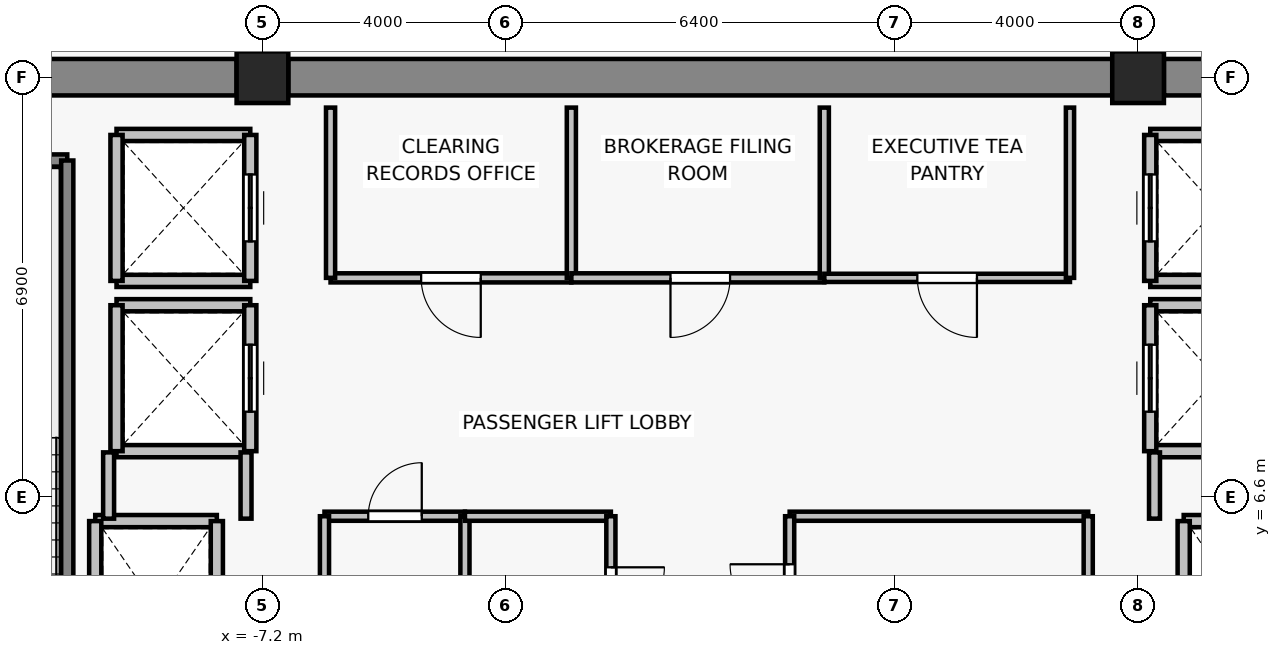
"""IFC4 building model, lengths in metres.
Left out: names, types, materials, properties, quantities, classifications, styles, units other than length and angle.
Written with IfcOpenShell. Run it as: python <this file> out.ifc"""

import sys

from ifc_helpers import new_model, si_unit, direction, frame, frame_2d, origin, origin_2d, place, context, subcontext, project, spatial, rectangle, extrude, source, transform, mapped, element, fill, save


model = new_model("IFC4")
c1 = context("Model", 3, precision=1e-05, world=origin(), true_north=direction((0.0, 1.0)))
c2 = subcontext(c1, "Body", "Model", "MODEL_VIEW")
j1 = project(units=[si_unit("LENGTHUNIT", "METRE"), si_unit("PLANEANGLEUNIT", "RADIAN")], contexts=[c1])
p1 = place(None, origin())
s1 = spatial("IfcSite", under=j1, at=p1, CompositionType="ELEMENT")
p2 = place(p1, origin())
s2 = spatial("IfcBuilding", under=s1, at=p2, CompositionType="ELEMENT")
p3 = place(p2, frame((0.0, 0.0, 228.7)))
s3 = spatial("IfcBuildingStorey", under=s2, at=p3, CompositionType="ELEMENT", Elevation=228.7)
for number, where, z_axis, x_axis in (
    (1, (-7.2, 13.5, 0.0), (0.0, 0.0, 1.0), (1.0, 0.0, 0.0)),
    (2, (7.2, 13.5, 0.0), (0.0, 0.0, 1.0), (1.0, 0.0, 0.0)),
):
    element("IfcColumn", number, at=place(p3, frame(where, z_axis=z_axis, x_axis=x_axis)), inside=s3, PredefinedType="COLUMN", context=c2, shape_type="SweptSolid", body=[
        extrude(rectangle(XDim=0.85, YDim=0.85, at=origin_2d()), origin(), (0.0, 0.0, 1.0), 3.3),
    ])
p4 = place(p3, frame((-13.975, 13.5, 0.0), z_axis=(0.0, 0.0, 1.0), x_axis=(1.0, 0.0, 0.0)))
e3 = element("IfcWall", 3, at=p4, inside=s3, PredefinedType="SHEAR", context=c2, shape_type="SweptSolid", body=[
    extrude(rectangle(XDim=6.35, YDim=0.6, at=frame_2d((3.175, 0.0))), origin(), (0.0, 0.0, 1.0), 3.075),
])
p5 = place(p3, frame((-6.775, 13.5, 0.0), z_axis=(0.0, 0.0, 1.0), x_axis=(1.0, 0.0, 0.0)))
e4 = element("IfcWall", 4, at=p5, inside=s3, PredefinedType="SHEAR", context=c2, shape_type="SweptSolid", body=[
    extrude(rectangle(XDim=13.55, YDim=0.6, at=frame_2d((6.775, 0.0))), origin(), (0.0, 0.0, 1.0), 3.075),
])
p6 = place(p3, frame((7.625, 13.5, 0.0), z_axis=(0.0, 0.0, 1.0), x_axis=(1.0, 0.0, 0.0)))
e5 = element("IfcWall", 5, at=p6, inside=s3, PredefinedType="SHEAR", context=c2, shape_type="SweptSolid", body=[
    extrude(rectangle(XDim=6.35, YDim=0.6, at=frame_2d((3.175, 0.0))), origin(), (0.0, 0.0, 1.0), 3.075),
])
p7 = place(p3, frame((-9.95, 6.2, 0.0), z_axis=(0.0, 0.0, 1.0), x_axis=(1.0, 0.0, 0.0)))
e6 = element("IfcWall", 6, at=p7, inside=s3, PredefinedType="SOLIDWALL", context=c2, shape_type="SweptSolid", body=[
    extrude(rectangle(XDim=2.0, YDim=0.2, at=frame_2d((1.0, 0.0))), origin(), (0.0, 0.0, 1.0), 3.075),
])
for number, where, z_axis, x_axis in (
    (7, (-9.95, 3.4, 0.0), (0.0, 0.0, 1.0), (0.0, 1.0, 0.0)),
    (8, (-7.95, 6.2, 0.0), (0.0, 0.0, 1.0), (0.0, -1.0, 0.0)),
):
    element("IfcWall", number, at=place(p3, frame(where, z_axis=z_axis, x_axis=x_axis)), inside=s3, PredefinedType="SOLIDWALL", context=c2, shape_type="SweptSolid", body=[
        extrude(rectangle(XDim=2.8, YDim=0.2, at=frame_2d((1.4, 0.0))), origin(), (0.0, 0.0, 1.0), 3.075),
    ])
p8 = place(p3, frame((7.95, 6.2, 0.0), z_axis=(0.0, 0.0, 1.0), x_axis=(1.0, 0.0, 0.0)))
e9 = element("IfcWall", 9, at=p8, inside=s3, PredefinedType="SOLIDWALL", context=c2, shape_type="SweptSolid", body=[
    extrude(rectangle(XDim=2.0, YDim=0.2, at=frame_2d((1.0, 0.0))), origin(), (0.0, 0.0, 1.0), 3.075),
])
p9 = place(p3, frame((7.95, 3.4, 0.0), z_axis=(0.0, 0.0, 1.0), x_axis=(0.0, 1.0, 0.0)))
e10 = element("IfcWall", 10, at=p9, inside=s3, PredefinedType="SOLIDWALL", context=c2, shape_type="SweptSolid", body=[
    extrude(rectangle(XDim=2.8, YDim=0.2, at=frame_2d((1.4, 0.0))), origin(), (0.0, 0.0, 1.0), 3.075),
])
for number, where, z_axis, x_axis in (
    (11, (-7.4, 7.35, 0.0), (0.0, 0.0, 1.0), (-1.0, 0.0, 0.0)),
    (12, (-9.6, 9.75, 0.0), (0.0, 0.0, 1.0), (1.0, 0.0, 0.0)),
):
    element("IfcWall", number, at=place(p3, frame(where, z_axis=z_axis, x_axis=x_axis)), inside=s3, PredefinedType="SOLIDWALL", context=c2, shape_type="SweptSolid", body=[
        extrude(rectangle(XDim=2.2, YDim=0.2, at=frame_2d((1.1, 0.0))), origin(), (0.0, 0.0, 1.0), 2.615),
    ])
p10 = place(p3, frame((-9.6, 7.35, 0.0), z_axis=(0.0, 0.0, 1.0), x_axis=(0.0, 1.0, 0.0)))
e13 = element("IfcWall", 13, at=p10, inside=s3, PredefinedType="SOLIDWALL", context=c2, shape_type="SweptSolid", body=[
    extrude(rectangle(XDim=2.4, YDim=0.2, at=frame_2d((1.2, 0.0))), origin(), (0.0, 0.0, 1.0), 3.075),
])
p11 = place(p3, frame((-7.4, 9.75, 0.0), z_axis=(0.0, 0.0, 1.0), x_axis=(0.0, -1.0, 0.0)))
e14 = element("IfcWall", 14, at=p11, inside=s3, PredefinedType="SOLIDWALL", context=c2, shape_type="SweptSolid", body=[
    extrude(rectangle(XDim=2.4, YDim=0.2, at=frame_2d((1.2, 0.0))), origin(), (0.0, 0.0, 1.0), 2.615),
])
p12 = place(p11, frame((0.65, 0.0, 0.0)))
e15 = element("IfcOpeningElement", 15, at=p12, cuts=e14, PredefinedType="OPENING", context=c2, shape_type="SweptSolid", body=[
    extrude(rectangle(XDim=1.1, YDim=2.2, at=frame_2d((0.55, 1.1))), frame((0.0, 0.11, 0.0), z_axis=(0.0, -1.0, 0.0), x_axis=(1.0, 0.0, 0.0)), (0.0, 0.0, 1.0), 0.22),
])
for number, where, z_axis, x_axis in (
    (16, (-7.4, 10.15, 0.0), (0.0, 0.0, 1.0), (-1.0, 0.0, 0.0)),
    (17, (-9.6, 12.55, 0.0), (0.0, 0.0, 1.0), (1.0, 0.0, 0.0)),
):
    element("IfcWall", number, at=place(p3, frame(where, z_axis=z_axis, x_axis=x_axis)), inside=s3, PredefinedType="SOLIDWALL", context=c2, shape_type="SweptSolid", body=[
        extrude(rectangle(XDim=2.2, YDim=0.2, at=frame_2d((1.1, 0.0))), origin(), (0.0, 0.0, 1.0), 2.615),
    ])
p13 = place(p3, frame((-9.6, 10.15, 0.0), z_axis=(0.0, 0.0, 1.0), x_axis=(0.0, 1.0, 0.0)))
e18 = element("IfcWall", 18, at=p13, inside=s3, PredefinedType="SOLIDWALL", context=c2, shape_type="SweptSolid", body=[
    extrude(rectangle(XDim=2.4, YDim=0.2, at=frame_2d((1.2, 0.0))), origin(), (0.0, 0.0, 1.0), 3.075),
])
p14 = place(p3, frame((-7.4, 12.55, 0.0), z_axis=(0.0, 0.0, 1.0), x_axis=(0.0, -1.0, 0.0)))
e19 = element("IfcWall", 19, at=p14, inside=s3, PredefinedType="SOLIDWALL", context=c2, shape_type="SweptSolid", body=[
    extrude(rectangle(XDim=2.4, YDim=0.2, at=frame_2d((1.2, 0.0))), origin(), (0.0, 0.0, 1.0), 2.615),
])
p15 = place(p14, frame((0.65, 0.0, 0.0)))
e20 = element("IfcOpeningElement", 20, at=p15, cuts=e19, PredefinedType="OPENING", context=c2, shape_type="SweptSolid", body=[
    extrude(rectangle(XDim=1.1, YDim=2.2, at=frame_2d((0.55, 1.1))), frame((0.0, 0.11, 0.0), z_axis=(0.0, -1.0, 0.0), x_axis=(1.0, 0.0, 0.0)), (0.0, 0.0, 1.0), 0.22),
])
for number, where, z_axis, x_axis in (
    (21, (9.6, 7.35, 0.0), (0.0, 0.0, 1.0), (-1.0, 0.0, 0.0)),
    (22, (7.4, 9.75, 0.0), (0.0, 0.0, 1.0), (1.0, 0.0, 0.0)),
):
    element("IfcWall", number, at=place(p3, frame(where, z_axis=z_axis, x_axis=x_axis)), inside=s3, PredefinedType="SOLIDWALL", context=c2, shape_type="SweptSolid", body=[
        extrude(rectangle(XDim=2.2, YDim=0.2, at=frame_2d((1.1, 0.0))), origin(), (0.0, 0.0, 1.0), 2.615),
    ])
p16 = place(p3, frame((7.4, 7.35, 0.0), z_axis=(0.0, 0.0, 1.0), x_axis=(0.0, 1.0, 0.0)))
e23 = element("IfcWall", 23, at=p16, inside=s3, PredefinedType="SOLIDWALL", context=c2, shape_type="SweptSolid", body=[
    extrude(rectangle(XDim=2.4, YDim=0.2, at=frame_2d((1.2, 0.0))), origin(), (0.0, 0.0, 1.0), 2.615),
])
p17 = place(p16, frame((0.65, 0.0, 0.0)))
e24 = element("IfcOpeningElement", 24, at=p17, cuts=e23, PredefinedType="OPENING", context=c2, shape_type="SweptSolid", body=[
    extrude(rectangle(XDim=1.1, YDim=2.2, at=frame_2d((0.55, 1.1))), frame((0.0, 0.11, 0.0), z_axis=(0.0, -1.0, 0.0), x_axis=(1.0, 0.0, 0.0)), (0.0, 0.0, 1.0), 0.22),
])
for number, where, z_axis, x_axis in (
    (25, (9.6, 10.15, 0.0), (0.0, 0.0, 1.0), (-1.0, 0.0, 0.0)),
    (26, (7.4, 12.55, 0.0), (0.0, 0.0, 1.0), (1.0, 0.0, 0.0)),
):
    element("IfcWall", number, at=place(p3, frame(where, z_axis=z_axis, x_axis=x_axis)), inside=s3, PredefinedType="SOLIDWALL", context=c2, shape_type="SweptSolid", body=[
        extrude(rectangle(XDim=2.2, YDim=0.2, at=frame_2d((1.1, 0.0))), origin(), (0.0, 0.0, 1.0), 2.615),
    ])
p18 = place(p3, frame((7.4, 10.15, 0.0), z_axis=(0.0, 0.0, 1.0), x_axis=(0.0, 1.0, 0.0)))
e27 = element("IfcWall", 27, at=p18, inside=s3, PredefinedType="SOLIDWALL", context=c2, shape_type="SweptSolid", body=[
    extrude(rectangle(XDim=2.4, YDim=0.2, at=frame_2d((1.2, 0.0))), origin(), (0.0, 0.0, 1.0), 2.615),
])
p19 = place(p18, frame((0.65, 0.0, 0.0)))
e28 = element("IfcOpeningElement", 28, at=p19, cuts=e27, PredefinedType="OPENING", context=c2, shape_type="SweptSolid", body=[
    extrude(rectangle(XDim=1.1, YDim=2.2, at=frame_2d((0.55, 1.1))), frame((0.0, 0.11, 0.0), z_axis=(0.0, -1.0, 0.0), x_axis=(1.0, 0.0, 0.0)), (0.0, 0.0, 1.0), 0.22),
])
p20 = place(p3, frame((-13.93, 12.13, 0.0), z_axis=(0.0, 0.0, 1.0), x_axis=(1.0, 0.0, 0.0)))
e29 = element("IfcWall", 29, at=p20, inside=s3, PredefinedType="SOLIDWALL", context=c2, shape_type="SweptSolid", body=[
    extrude(rectangle(XDim=3.52, YDim=0.2, at=frame_2d((1.76, 0.0))), origin(), (0.0, 0.0, 1.0), 3.075),
])
p21 = place(p3, frame((-10.41, 12.13, 0.0), z_axis=(0.0, 0.0, 1.0), x_axis=(0.0, -1.0, 0.0)))
e30 = element("IfcWall", 30, at=p21, inside=s3, PredefinedType="SOLIDWALL", context=c2, shape_type="SweptSolid", body=[
    extrude(rectangle(XDim=8.84, YDim=0.2, at=frame_2d((4.42, 0.0))), origin(), (0.0, 0.0, 1.0), 3.075),
])
p22 = place(p3, frame((-9.73, 6.24, 0.0), z_axis=(0.0, 0.0, 1.0), x_axis=(0.0, 1.0, 0.0)))
e31 = element("IfcWall", 31, at=p22, inside=s3, PredefinedType="PARTITIONING", context=c2, shape_type="SweptSolid", body=[
    extrude(rectangle(XDim=1.09, YDim=0.18, at=frame_2d((0.545, 0.0))), origin(), (0.0, 0.0, 1.0), 3.075),
])
for number, where, z_axis, x_axis in (
    (32, (-7.47, 7.33, 0.0), (0.0, 0.0, 1.0), (0.0, -1.0, 0.0)),
    (33, (7.47, 6.24, 0.0), (0.0, 0.0, 1.0), (0.0, 1.0, 0.0)),
):
    element("IfcWall", number, at=place(p3, frame(where, z_axis=z_axis, x_axis=x_axis)), inside=s3, PredefinedType="PARTITIONING", context=c2, shape_type="SweptSolid", body=[
        extrude(rectangle(XDim=1.09, YDim=0.18, at=frame_2d((0.545, 0.0))), origin(), (0.0, 0.0, 1.0), 2.615),
    ])
p23 = place(p3, frame((-2.12, 10.2, 0.0), z_axis=(0.0, 0.0, 1.0), x_axis=(-1.0, 0.0, 0.0)))
e34 = element("IfcWall", 34, at=p23, inside=s3, PredefinedType="PARTITIONING", context=c2, shape_type="SweptSolid", body=[
    extrude(rectangle(XDim=3.96, YDim=0.15, at=frame_2d((1.98, 0.0))), origin(), (0.0, 0.0, 1.0), 2.59),
])
p24 = place(p23, frame((1.49, 0.0, 0.0)))
e35 = element("IfcOpeningElement", 35, at=p24, cuts=e34, PredefinedType="OPENING", context=c2, shape_type="SweptSolid", body=[
    extrude(rectangle(XDim=0.98, YDim=2.15, at=frame_2d((0.49, 1.075))), frame((0.0, 0.085, 0.0), z_axis=(0.0, -1.0, 0.0), x_axis=(1.0, 0.0, 0.0)), (0.0, 0.0, 1.0), 0.17),
])
for number, where, z_axis, x_axis in (
    (36, (-6.08, 10.2, 0.0), (0.0, 0.0, 1.0), (0.0, 1.0, 0.0)),
    (37, (-2.12, 13.0, 0.0), (0.0, 0.0, 1.0), (0.0, -1.0, 0.0)),
):
    element("IfcWall", number, at=place(p3, frame(where, z_axis=z_axis, x_axis=x_axis)), inside=s3, PredefinedType="PARTITIONING", context=c2, shape_type="SweptSolid", body=[
        extrude(rectangle(XDim=2.8, YDim=0.15, at=frame_2d((1.4, 0.0))), origin(), (0.0, 0.0, 1.0), 3.075),
    ])
p25 = place(p3, frame((2.04, 10.2, 0.0), z_axis=(0.0, 0.0, 1.0), x_axis=(-1.0, 0.0, 0.0)))
e38 = element("IfcWall", 38, at=p25, inside=s3, PredefinedType="PARTITIONING", context=c2, shape_type="SweptSolid", body=[
    extrude(rectangle(XDim=4.16, YDim=0.15, at=frame_2d((2.08, 0.0))), origin(), (0.0, 0.0, 1.0), 2.59),
])
p26 = place(p25, frame((1.55, 0.0, 0.0)))
e39 = element("IfcOpeningElement", 39, at=p26, cuts=e38, PredefinedType="OPENING", context=c2, shape_type="SweptSolid", body=[
    extrude(rectangle(XDim=0.98, YDim=2.15, at=frame_2d((0.49, 1.075))), frame((0.0, 0.085, 0.0), z_axis=(0.0, -1.0, 0.0), x_axis=(1.0, 0.0, 0.0)), (0.0, 0.0, 1.0), 0.17),
])
p27 = place(p3, frame((2.04, 13.0, 0.0), z_axis=(0.0, 0.0, 1.0), x_axis=(0.0, -1.0, 0.0)))
e40 = element("IfcWall", 40, at=p27, inside=s3, PredefinedType="PARTITIONING", context=c2, shape_type="SweptSolid", body=[
    extrude(rectangle(XDim=2.8, YDim=0.15, at=frame_2d((1.4, 0.0))), origin(), (0.0, 0.0, 1.0), 3.075),
])
p28 = place(p3, frame((6.08, 10.2, 0.0), z_axis=(0.0, 0.0, 1.0), x_axis=(-1.0, 0.0, 0.0)))
e41 = element("IfcWall", 41, at=p28, inside=s3, PredefinedType="PARTITIONING", context=c2, shape_type="SweptSolid", body=[
    extrude(rectangle(XDim=4.04, YDim=0.135, at=frame_2d((2.02, 0.0))), origin(), (0.0, 0.0, 1.0), 2.59),
])
p29 = place(p28, frame((1.53, 0.0, 0.0)))
e42 = element("IfcOpeningElement", 42, at=p29, cuts=e41, PredefinedType="OPENING", context=c2, shape_type="SweptSolid", body=[
    extrude(rectangle(XDim=0.98, YDim=2.15, at=frame_2d((0.49, 1.075))), frame((0.0, 0.077, 0.0), z_axis=(0.0, -1.0, 0.0), x_axis=(1.0, 0.0, 0.0)), (0.0, 0.0, 1.0), 0.155),
])
p30 = place(p3, frame((6.08, 13.0, 0.0), z_axis=(0.0, 0.0, 1.0), x_axis=(0.0, -1.0, 0.0)))
e43 = element("IfcWall", 43, at=p30, inside=s3, PredefinedType="PARTITIONING", context=c2, shape_type="SweptSolid", body=[
    extrude(rectangle(XDim=2.8, YDim=0.135, at=frame_2d((1.4, 0.0))), origin(), (0.0, 0.0, 1.0), 3.075),
])
p31 = place(p3, frame((-6.18, 6.28, 0.0), z_axis=(0.0, 0.0, 1.0), x_axis=(1.0, 0.0, 0.0)))
e44 = element("IfcWall", 44, at=p31, inside=s3, PredefinedType="PARTITIONING", context=c2, shape_type="SweptSolid", body=[
    extrude(rectangle(XDim=2.31, YDim=0.15, at=frame_2d((1.155, 0.0))), origin(), (0.0, 0.0, 1.0), 3.075),
])
p32 = place(p31, frame((0.72, 0.0, 0.0)))
e45 = element("IfcOpeningElement", 45, at=p32, cuts=e44, PredefinedType="OPENING", context=c2, shape_type="SweptSolid", body=[
    extrude(rectangle(XDim=0.88, YDim=2.1, at=frame_2d((0.44, 1.05))), frame((0.0, 0.085, 0.0), z_axis=(0.0, -1.0, 0.0), x_axis=(1.0, 0.0, 0.0)), (0.0, 0.0, 1.0), 0.17),
])
for number, where, z_axis, x_axis in (
    (46, (-6.18, 3.76, 0.0), (0.0, 0.0, 1.0), (0.0, 1.0, 0.0)),
    (47, (-3.87, 6.28, 0.0), (0.0, 0.0, 1.0), (0.0, -1.0, 0.0)),
):
    element("IfcWall", number, at=place(p3, frame(where, z_axis=z_axis, x_axis=x_axis)), inside=s3, PredefinedType="PARTITIONING", context=c2, shape_type="SweptSolid", body=[
        extrude(rectangle(XDim=2.52, YDim=0.15, at=frame_2d((1.26, 0.0))), origin(), (0.0, 0.0, 1.0), 3.075),
    ])
p33 = place(p3, frame((-3.87, 6.28, 0.0), z_axis=(0.0, 0.0, 1.0), x_axis=(1.0, 0.0, 0.0)))
e48 = element("IfcWall", 48, at=p33, inside=s3, PredefinedType="PARTITIONING", context=c2, shape_type="SweptSolid", body=[
    extrude(rectangle(XDim=2.4, YDim=0.15, at=frame_2d((1.2, 0.0))), origin(), (0.0, 0.0, 1.0), 3.075),
])
p34 = place(p3, frame((-1.47, 6.28, 0.0), z_axis=(0.0, 0.0, 1.0), x_axis=(0.0, -1.0, 0.0)))
e49 = element("IfcWall", 49, at=p34, inside=s3, PredefinedType="PARTITIONING", context=c2, shape_type="SweptSolid", body=[
    extrude(rectangle(XDim=2.52, YDim=0.15, at=frame_2d((1.26, 0.0))), origin(), (0.0, 0.0, 1.0), 3.075),
])
p35 = place(p34, frame((0.84, 0.0, 0.0)))
e50 = element("IfcOpeningElement", 50, at=p35, cuts=e49, PredefinedType="OPENING", context=c2, shape_type="SweptSolid", body=[
    extrude(rectangle(XDim=0.88, YDim=2.1, at=frame_2d((0.44, 1.05))), frame((0.0, 0.085, 0.0), z_axis=(0.0, -1.0, 0.0), x_axis=(1.0, 0.0, 0.0)), (0.0, 0.0, 1.0), 0.17),
])
p36 = place(p3, frame((1.47, 6.28, 0.0), z_axis=(0.0, 0.0, 1.0), x_axis=(1.0, 0.0, 0.0)))
e51 = element("IfcWall", 51, at=p36, inside=s3, PredefinedType="PARTITIONING", context=c2, shape_type="SweptSolid", body=[
    extrude(rectangle(XDim=4.91, YDim=0.15, at=frame_2d((2.455, 0.0))), origin(), (0.0, 0.0, 1.0), 3.075),
])
p37 = place(p3, frame((1.47, 3.76, 0.0), z_axis=(0.0, 0.0, 1.0), x_axis=(0.0, 1.0, 0.0)))
e52 = element("IfcWall", 52, at=p37, inside=s3, PredefinedType="PARTITIONING", context=c2, shape_type="SweptSolid", body=[
    extrude(rectangle(XDim=2.52, YDim=0.15, at=frame_2d((1.26, 0.0))), origin(), (0.0, 0.0, 1.0), 3.075),
])
p38 = place(p37, frame((0.75, 0.0, 0.0)))
e53 = element("IfcOpeningElement", 53, at=p38, cuts=e52, PredefinedType="OPENING", context=c2, shape_type="SweptSolid", body=[
    extrude(rectangle(XDim=0.98, YDim=2.15, at=frame_2d((0.49, 1.075))), frame((0.0, 0.085, 0.0), z_axis=(0.0, -1.0, 0.0), x_axis=(1.0, 0.0, 0.0)), (0.0, 0.0, 1.0), 0.17),
])
p39 = place(p3, frame((6.38, 6.28, 0.0), z_axis=(0.0, 0.0, 1.0), x_axis=(0.0, -1.0, 0.0)))
e54 = element("IfcWall", 54, at=p39, inside=s3, PredefinedType="PARTITIONING", context=c2, shape_type="SweptSolid", body=[
    extrude(rectangle(XDim=2.52, YDim=0.15, at=frame_2d((1.26, 0.0))), origin(), (0.0, 0.0, 1.0), 3.075),
])
m1 = source(origin(), c2, "Body", "SweptSolid", [
    extrude(rectangle(XDim=1.1, YDim=2.2, at=frame_2d((0.55, 1.1))), frame((0.0, 0.025, 0.0), z_axis=(0.0, -1.0, 0.0), x_axis=(1.0, 0.0, 0.0)), (0.0, 0.0, 1.0), 0.05),
])
p40 = place(p12, origin())
e55 = element("IfcDoor", 55, at=p40, inside=s3, OperationType="DOUBLE_DOOR_SLIDING", PredefinedType="DOOR", context=c2, shape_type="MappedRepresentation", body=[
    mapped(m1, transform((0.0, 0.0, 0.0), x_axis=(1.0, 0.0, 0.0), y_axis=(0.0, 1.0, 0.0), z_axis=(0.0, 0.0, 1.0), scale=1.0)),
])
fill(e15, e55)
p41 = place(p15, origin())
e56 = element("IfcDoor", 56, at=p41, inside=s3, OperationType="DOUBLE_DOOR_SLIDING", PredefinedType="DOOR", context=c2, shape_type="MappedRepresentation", body=[
    mapped(m1, transform((0.0, 0.0, 0.0), x_axis=(1.0, 0.0, 0.0), y_axis=(0.0, 1.0, 0.0), z_axis=(0.0, 0.0, 1.0), scale=1.0)),
])
fill(e20, e56)
p42 = place(p17, origin())
e57 = element("IfcDoor", 57, at=p42, inside=s3, OperationType="DOUBLE_DOOR_SLIDING", PredefinedType="DOOR", context=c2, shape_type="MappedRepresentation", body=[
    mapped(m1, transform((0.0, 0.0, 0.0), x_axis=(1.0, 0.0, 0.0), y_axis=(0.0, 1.0, 0.0), z_axis=(0.0, 0.0, 1.0), scale=1.0)),
])
fill(e24, e57)
p43 = place(p19, origin())
e58 = element("IfcDoor", 58, at=p43, inside=s3, OperationType="DOUBLE_DOOR_SLIDING", PredefinedType="DOOR", context=c2, shape_type="MappedRepresentation", body=[
    mapped(m1, transform((0.0, 0.0, 0.0), x_axis=(1.0, 0.0, 0.0), y_axis=(0.0, 1.0, 0.0), z_axis=(0.0, 0.0, 1.0), scale=1.0)),
])
fill(e28, e58)
m2 = source(origin(), c2, "Body", "SweptSolid", [
    extrude(rectangle(XDim=0.98, YDim=2.15, at=frame_2d((0.49, 1.075))), frame((0.0, 0.025, 0.0), z_axis=(0.0, -1.0, 0.0), x_axis=(1.0, 0.0, 0.0)), (0.0, 0.0, 1.0), 0.05),
])
p44 = place(p24, origin())
e59 = element("IfcDoor", 59, at=p44, inside=s3, OperationType="SINGLE_SWING_LEFT", PredefinedType="DOOR", context=c2, shape_type="MappedRepresentation", body=[
    mapped(m2, transform((0.0, 0.0, 0.0), x_axis=(1.0, 0.0, 0.0), y_axis=(0.0, 1.0, 0.0), z_axis=(0.0, 0.0, 1.0), scale=1.0)),
])
fill(e35, e59)
p45 = place(p26, origin())
e60 = element("IfcDoor", 60, at=p45, inside=s3, OperationType="SINGLE_SWING_RIGHT", PredefinedType="DOOR", context=c2, shape_type="MappedRepresentation", body=[
    mapped(m2, transform((0.0, 0.0, 0.0), x_axis=(1.0, 0.0, 0.0), y_axis=(0.0, 1.0, 0.0), z_axis=(0.0, 0.0, 1.0), scale=1.0)),
])
fill(e39, e60)
p46 = place(p29, origin())
e61 = element("IfcDoor", 61, at=p46, inside=s3, OperationType="SINGLE_SWING_LEFT", PredefinedType="DOOR", context=c2, shape_type="MappedRepresentation", body=[
    mapped(m2, transform((0.0, 0.0, 0.0), x_axis=(1.0, 0.0, 0.0), y_axis=(0.0, 1.0, 0.0), z_axis=(0.0, 0.0, 1.0), scale=1.0)),
])
fill(e42, e61)
m3 = source(origin(), c2, "Body", "SweptSolid", [
    extrude(rectangle(XDim=0.88, YDim=2.1, at=frame_2d((0.44, 1.05))), frame((0.0, 0.025, 0.0), z_axis=(0.0, -1.0, 0.0), x_axis=(1.0, 0.0, 0.0)), (0.0, 0.0, 1.0), 0.05),
])
p47 = place(p32, origin())
e62 = element("IfcDoor", 62, at=p47, inside=s3, OperationType="SINGLE_SWING_RIGHT", PredefinedType="DOOR", context=c2, shape_type="MappedRepresentation", body=[
    mapped(m3, transform((0.0, 0.0, 0.0), x_axis=(1.0, 0.0, 0.0), y_axis=(0.0, 1.0, 0.0), z_axis=(0.0, 0.0, 1.0), scale=1.0)),
])
fill(e45, e62)
p48 = place(p35, origin())
e63 = element("IfcDoor", 63, at=p48, inside=s3, OperationType="SINGLE_SWING_LEFT", PredefinedType="DOOR", context=c2, shape_type="MappedRepresentation", body=[
    mapped(m3, transform((0.0, 0.0, 0.0), x_axis=(1.0, 0.0, 0.0), y_axis=(0.0, 1.0, 0.0), z_axis=(0.0, 0.0, 1.0), scale=1.0)),
])
fill(e50, e63)
p49 = place(p38, origin())
e64 = element("IfcDoor", 64, at=p49, inside=s3, OperationType="SINGLE_SWING_RIGHT", PredefinedType="DOOR", context=c2, shape_type="MappedRepresentation", body=[
    mapped(m2, transform((0.0, 0.0, 0.0), x_axis=(1.0, 0.0, 0.0), y_axis=(0.0, 1.0, 0.0), z_axis=(0.0, 0.0, 1.0), scale=1.0)),
])
fill(e53, e64)
save(model, sys.argv[1])
